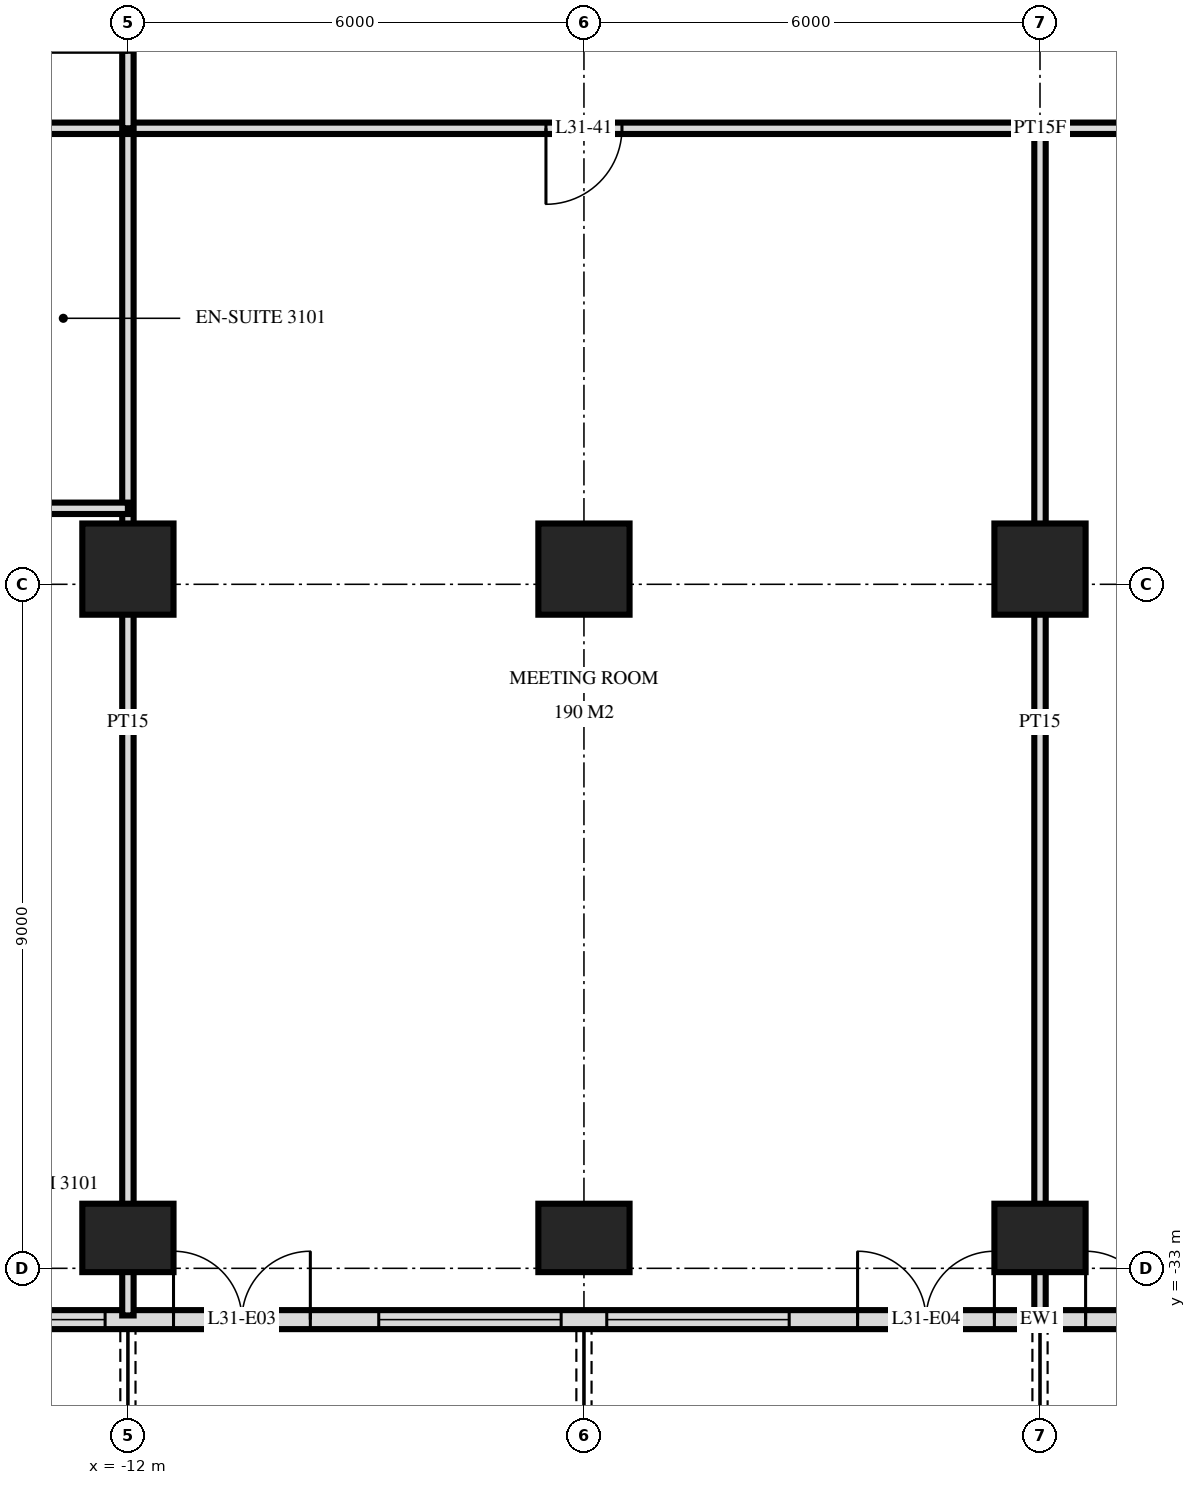
"""IFC4 building model, lengths in metres.
Left out: names, types, materials, properties, quantities, classifications, styles, units other than length and angle.
Written with IfcOpenShell. Run it as: python <this file> out.ifc"""

import sys

from ifc_helpers import new_model, si_unit, direction, frame, frame_2d, origin, origin_2d, place, context, subcontext, project, spatial, rectangle, extrude, element, fill, save


model = new_model("IFC4")
c1 = context("Model", 3, precision=1e-05, world=origin(), true_north=direction((0.0, 1.0)))
c2 = subcontext(c1, "Body", "Model", "MODEL_VIEW")
j1 = project(units=[si_unit("LENGTHUNIT", "METRE"), si_unit("PLANEANGLEUNIT", "RADIAN")], contexts=[c1])
p1 = place(None, origin())
s1 = spatial("IfcSite", under=j1, at=p1, CompositionType="ELEMENT")
p2 = place(p1, origin())
s2 = spatial("IfcBuilding", under=s1, at=p2, CompositionType="ELEMENT")
p3 = place(p2, frame((0.0, 0.0, 123.6)))
s3 = spatial("IfcBuildingStorey", under=s2, at=p3, CompositionType="ELEMENT", Elevation=123.6)
p4 = place(p3, frame((-12.0, -32.6, 0.0), z_axis=(0.0, 0.0, 1.0), x_axis=(1.0, 0.0, 0.0)))
e1 = element("IfcColumn", 1, at=p4, inside=s3, PredefinedType="COLUMN", context=c2, shape_type="SweptSolid", body=[
    extrude(rectangle(XDim=1.2, YDim=0.9, at=origin_2d()), origin(), (0.0, 0.0, 1.0), 3.6),
])
p5 = place(p3, frame((-12.0, -23.8, 0.0), z_axis=(0.0, 0.0, 1.0), x_axis=(1.0, 0.0, 0.0)))
e2 = element("IfcColumn", 2, at=p5, inside=s3, PredefinedType="COLUMN", context=c2, shape_type="SweptSolid", body=[
    extrude(rectangle(XDim=1.2, YDim=1.2, at=origin_2d()), origin(), (0.0, 0.0, 1.0), 3.6),
])
p6 = place(p3, frame((-6.0, -32.6, 0.0), z_axis=(0.0, 0.0, 1.0), x_axis=(1.0, 0.0, 0.0)))
e3 = element("IfcColumn", 3, at=p6, inside=s3, PredefinedType="COLUMN", context=c2, shape_type="SweptSolid", body=[
    extrude(rectangle(XDim=1.2, YDim=0.9, at=origin_2d()), origin(), (0.0, 0.0, 1.0), 3.6),
])
p7 = place(p3, frame((-6.0, -23.8, 0.0), z_axis=(0.0, 0.0, 1.0), x_axis=(1.0, 0.0, 0.0)))
e4 = element("IfcColumn", 4, at=p7, inside=s3, PredefinedType="COLUMN", context=c2, shape_type="SweptSolid", body=[
    extrude(rectangle(XDim=1.2, YDim=1.2, at=origin_2d()), origin(), (0.0, 0.0, 1.0), 3.6),
])
p8 = place(p3, frame((0.0, -32.6, 0.0), z_axis=(0.0, 0.0, 1.0), x_axis=(1.0, 0.0, 0.0)))
e5 = element("IfcColumn", 5, at=p8, inside=s3, PredefinedType="COLUMN", context=c2, shape_type="SweptSolid", body=[
    extrude(rectangle(XDim=1.2, YDim=0.9, at=origin_2d()), origin(), (0.0, 0.0, 1.0), 3.6),
])
p9 = place(p3, frame((0.0, -23.8, 0.0), z_axis=(0.0, 0.0, 1.0), x_axis=(1.0, 0.0, 0.0)))
e6 = element("IfcColumn", 6, at=p9, inside=s3, PredefinedType="COLUMN", context=c2, shape_type="SweptSolid", body=[
    extrude(rectangle(XDim=1.2, YDim=1.2, at=origin_2d()), origin(), (0.0, 0.0, 1.0), 3.6),
])
p10 = place(p3, frame((-23.675, -33.675, 0.0), z_axis=(0.0, 0.0, 1.0), x_axis=(1.0, 0.0, 0.0)))
e7 = element("IfcWall", 7, at=p10, inside=s3, PredefinedType="SOLIDWALL", context=c2, shape_type="SweptSolid", body=[
    extrude(rectangle(XDim=47.351, YDim=0.25, at=frame_2d((23.675, 0.0))), origin(), (0.0, 0.0, 1.0), 3.32),
])
p11 = place(p10, frame((3.425, 0.0, 0.0)))
e8 = element("IfcOpeningElement", 8, at=p11, cuts=e7, PredefinedType="OPENING", context=c2, shape_type="SweptSolid", body=[
    extrude(rectangle(XDim=1.8, YDim=2.4, at=frame_2d((0.9, 1.2))), frame((0.0, 0.135, 0.0), z_axis=(0.0, -1.0, 0.0), x_axis=(1.0, 0.0, 0.0)), (0.0, 0.0, 1.0), 0.27),
])
p12 = place(p10, frame((6.275, 0.0, 0.0)))
e9 = element("IfcOpeningElement", 9, at=p12, cuts=e7, PredefinedType="OPENING", context=c2, shape_type="SweptSolid", body=[
    extrude(rectangle(XDim=1.8, YDim=2.4, at=frame_2d((0.9, 1.2))), frame((0.0, 0.135, 0.0), z_axis=(0.0, -1.0, 0.0), x_axis=(1.0, 0.0, 0.0)), (0.0, 0.0, 1.0), 0.27),
])
p13 = place(p10, frame((8.975, 0.0, 0.3)))
e10 = element("IfcOpeningElement", 10, at=p13, cuts=e7, PredefinedType="OPENING", context=c2, shape_type="SweptSolid", body=[
    extrude(rectangle(XDim=2.4, YDim=2.1, at=frame_2d((1.2, 1.05))), frame((0.0, 0.135, 0.0), z_axis=(0.0, -1.0, 0.0), x_axis=(1.0, 0.0, 0.0)), (0.0, 0.0, 1.0), 0.27),
])
p14 = place(p10, frame((12.275, 0.0, 0.0)))
e11 = element("IfcOpeningElement", 11, at=p14, cuts=e7, PredefinedType="OPENING", context=c2, shape_type="SweptSolid", body=[
    extrude(rectangle(XDim=1.8, YDim=2.4, at=frame_2d((0.9, 1.2))), frame((0.0, 0.135, 0.0), z_axis=(0.0, -1.0, 0.0), x_axis=(1.0, 0.0, 0.0)), (0.0, 0.0, 1.0), 0.27),
])
p15 = place(p10, frame((14.975, 0.0, 0.3)))
e12 = element("IfcOpeningElement", 12, at=p15, cuts=e7, PredefinedType="OPENING", context=c2, shape_type="SweptSolid", body=[
    extrude(rectangle(XDim=2.4, YDim=2.1, at=frame_2d((1.2, 1.05))), frame((0.0, 0.135, 0.0), z_axis=(0.0, -1.0, 0.0), x_axis=(1.0, 0.0, 0.0)), (0.0, 0.0, 1.0), 0.27),
])
p16 = place(p10, frame((17.975, 0.0, 0.3)))
e13 = element("IfcOpeningElement", 13, at=p16, cuts=e7, PredefinedType="OPENING", context=c2, shape_type="SweptSolid", body=[
    extrude(rectangle(XDim=2.4, YDim=2.1, at=frame_2d((1.2, 1.05))), frame((0.0, 0.135, 0.0), z_axis=(0.0, -1.0, 0.0), x_axis=(1.0, 0.0, 0.0)), (0.0, 0.0, 1.0), 0.27),
])
p17 = place(p10, frame((21.275, 0.0, 0.0)))
e14 = element("IfcOpeningElement", 14, at=p17, cuts=e7, PredefinedType="OPENING", context=c2, shape_type="SweptSolid", body=[
    extrude(rectangle(XDim=1.8, YDim=2.4, at=frame_2d((0.9, 1.2))), frame((0.0, 0.135, 0.0), z_axis=(0.0, -1.0, 0.0), x_axis=(1.0, 0.0, 0.0)), (0.0, 0.0, 1.0), 0.27),
])
p18 = place(p10, frame((24.275, 0.0, 0.0)))
e15 = element("IfcOpeningElement", 15, at=p18, cuts=e7, PredefinedType="OPENING", context=c2, shape_type="SweptSolid", body=[
    extrude(rectangle(XDim=1.8, YDim=2.4, at=frame_2d((0.9, 1.2))), frame((0.0, 0.135, 0.0), z_axis=(0.0, -1.0, 0.0), x_axis=(1.0, 0.0, 0.0)), (0.0, 0.0, 1.0), 0.27),
])
p19 = place(p10, frame((26.975, 0.0, 0.3)))
e16 = element("IfcOpeningElement", 16, at=p19, cuts=e7, PredefinedType="OPENING", context=c2, shape_type="SweptSolid", body=[
    extrude(rectangle(XDim=2.4, YDim=2.1, at=frame_2d((1.2, 1.05))), frame((0.0, 0.135, 0.0), z_axis=(0.0, -1.0, 0.0), x_axis=(1.0, 0.0, 0.0)), (0.0, 0.0, 1.0), 0.27),
])
p20 = place(p10, frame((30.275, 0.0, 0.0)))
e17 = element("IfcOpeningElement", 17, at=p20, cuts=e7, PredefinedType="OPENING", context=c2, shape_type="SweptSolid", body=[
    extrude(rectangle(XDim=1.8, YDim=2.4, at=frame_2d((0.9, 1.2))), frame((0.0, 0.135, 0.0), z_axis=(0.0, -1.0, 0.0), x_axis=(1.0, 0.0, 0.0)), (0.0, 0.0, 1.0), 0.27),
])
p21 = place(p10, frame((32.975, 0.0, 0.3)))
e18 = element("IfcOpeningElement", 18, at=p21, cuts=e7, PredefinedType="OPENING", context=c2, shape_type="SweptSolid", body=[
    extrude(rectangle(XDim=2.4, YDim=2.1, at=frame_2d((1.2, 1.05))), frame((0.0, 0.135, 0.0), z_axis=(0.0, -1.0, 0.0), x_axis=(1.0, 0.0, 0.0)), (0.0, 0.0, 1.0), 0.27),
])
p22 = place(p10, frame((36.275, 0.0, 0.0)))
e19 = element("IfcOpeningElement", 19, at=p22, cuts=e7, PredefinedType="OPENING", context=c2, shape_type="SweptSolid", body=[
    extrude(rectangle(XDim=1.8, YDim=2.4, at=frame_2d((0.9, 1.2))), frame((0.0, 0.135, 0.0), z_axis=(0.0, -1.0, 0.0), x_axis=(1.0, 0.0, 0.0)), (0.0, 0.0, 1.0), 0.27),
])
p23 = place(p10, frame((38.975, 0.0, 0.3)))
e20 = element("IfcOpeningElement", 20, at=p23, cuts=e7, PredefinedType="OPENING", context=c2, shape_type="SweptSolid", body=[
    extrude(rectangle(XDim=2.4, YDim=2.1, at=frame_2d((1.2, 1.05))), frame((0.0, 0.135, 0.0), z_axis=(0.0, -1.0, 0.0), x_axis=(1.0, 0.0, 0.0)), (0.0, 0.0, 1.0), 0.27),
])
p24 = place(p10, frame((41.975, 0.0, 0.3)))
e21 = element("IfcOpeningElement", 21, at=p24, cuts=e7, PredefinedType="OPENING", context=c2, shape_type="SweptSolid", body=[
    extrude(rectangle(XDim=2.4, YDim=2.1, at=frame_2d((1.2, 1.05))), frame((0.0, 0.135, 0.0), z_axis=(0.0, -1.0, 0.0), x_axis=(1.0, 0.0, 0.0)), (0.0, 0.0, 1.0), 0.27),
])
p25 = place(p10, frame((45.125, 0.0, 0.0)))
e22 = element("IfcOpeningElement", 22, at=p25, cuts=e7, PredefinedType="OPENING", context=c2, shape_type="SweptSolid", body=[
    extrude(rectangle(XDim=1.8, YDim=2.4, at=frame_2d((0.9, 1.2))), frame((0.0, 0.135, 0.0), z_axis=(0.0, -1.0, 0.0), x_axis=(1.0, 0.0, 0.0)), (0.0, 0.0, 1.0), 0.27),
])
p26 = place(p3, frame((0.0, -33.62, 0.0), z_axis=(0.0, 0.0, 1.0), x_axis=(0.0, 1.0, 0.0)))
e23 = element("IfcWall", 23, at=p26, inside=s3, PredefinedType="PARTITIONING", context=c2, shape_type="SweptSolid", body=[
    extrude(rectangle(XDim=15.62, YDim=0.15, at=frame_2d((7.81, 0.0))), origin(), (0.0, 0.0, 1.0), 3.32),
])
p27 = place(p3, frame((-12.0, -18.0, 0.0), z_axis=(0.0, 0.0, 1.0), x_axis=(0.0, 1.0, 0.0)))
e24 = element("IfcWall", 24, at=p27, inside=s3, PredefinedType="PARTITIONING", context=c2, shape_type="SweptSolid", body=[
    extrude(rectangle(XDim=2.95, YDim=0.15, at=frame_2d((1.475, 0.0))), origin(), (0.0, 0.0, 1.0), 3.32),
])
p28 = place(p27, frame((1.0, 0.0, 0.0)))
e25 = element("IfcOpeningElement", 25, at=p28, cuts=e24, PredefinedType="OPENING", context=c2, shape_type="SweptSolid", body=[
    extrude(rectangle(XDim=1.0, YDim=2.1, at=frame_2d((0.5, 1.05))), frame((0.0, 0.085, 0.0), z_axis=(0.0, -1.0, 0.0), x_axis=(1.0, 0.0, 0.0)), (0.0, 0.0, 1.0), 0.17),
])
p29 = place(p3, frame((-12.0, -33.62, 0.0), z_axis=(0.0, 0.0, 1.0), x_axis=(0.0, 1.0, 0.0)))
e26 = element("IfcWall", 26, at=p29, inside=s3, PredefinedType="PARTITIONING", context=c2, shape_type="SweptSolid", body=[
    extrude(rectangle(XDim=15.62, YDim=0.15, at=frame_2d((7.81, 0.0))), origin(), (0.0, 0.0, 1.0), 3.32),
])
p30 = place(p3, frame((-13.7, -23.0, 0.0), z_axis=(0.0, 0.0, 1.0), x_axis=(1.0, 0.0, 0.0)))
e27 = element("IfcWall", 27, at=p30, inside=s3, PredefinedType="PARTITIONING", context=c2, shape_type="SweptSolid", body=[
    extrude(rectangle(XDim=1.7, YDim=0.15, at=frame_2d((0.85, 0.0))), origin(), (0.0, 0.0, 1.0), 3.32),
])
p31 = place(p3, frame((-28.02, -18.0, 0.0), z_axis=(0.0, 0.0, 1.0), x_axis=(1.0, 0.0, 0.0)))
e28 = element("IfcWall", 28, at=p31, inside=s3, PredefinedType="PARTITIONING", context=c2, shape_type="SweptSolid", body=[
    extrude(rectangle(XDim=56.04, YDim=0.15, at=frame_2d((28.02, 0.0))), origin(), (0.0, 0.0, 1.0), 3.32),
])
p32 = place(p31, frame((13.17, 0.0, 0.0)))
e29 = element("IfcOpeningElement", 29, at=p32, cuts=e28, PredefinedType="OPENING", context=c2, shape_type="SweptSolid", body=[
    extrude(rectangle(XDim=1.0, YDim=2.1, at=frame_2d((0.5, 1.05))), frame((0.0, 0.085, 0.0), z_axis=(0.0, -1.0, 0.0), x_axis=(1.0, 0.0, 0.0)), (0.0, 0.0, 1.0), 0.17),
])
p33 = place(p31, frame((11.32, 0.0, 0.0)))
e30 = element("IfcOpeningElement", 30, at=p33, cuts=e28, PredefinedType="OPENING", context=c2, shape_type="SweptSolid", body=[
    extrude(rectangle(XDim=1.0, YDim=2.1, at=frame_2d((0.5, 1.05))), frame((0.0, 0.085, 0.0), z_axis=(0.0, -1.0, 0.0), x_axis=(1.0, 0.0, 0.0)), (0.0, 0.0, 1.0), 0.17),
])
p34 = place(p31, frame((41.87, 0.0, 0.0)))
e31 = element("IfcOpeningElement", 31, at=p34, cuts=e28, PredefinedType="OPENING", context=c2, shape_type="SweptSolid", body=[
    extrude(rectangle(XDim=1.0, YDim=2.1, at=frame_2d((0.5, 1.05))), frame((0.0, 0.085, 0.0), z_axis=(0.0, -1.0, 0.0), x_axis=(1.0, 0.0, 0.0)), (0.0, 0.0, 1.0), 0.17),
])
p35 = place(p31, frame((43.17, 0.0, 0.0)))
e32 = element("IfcOpeningElement", 32, at=p35, cuts=e28, PredefinedType="OPENING", context=c2, shape_type="SweptSolid", body=[
    extrude(rectangle(XDim=1.0, YDim=2.1, at=frame_2d((0.5, 1.05))), frame((0.0, 0.085, 0.0), z_axis=(0.0, -1.0, 0.0), x_axis=(1.0, 0.0, 0.0)), (0.0, 0.0, 1.0), 0.17),
])
p36 = place(p31, frame((46.72, 0.0, 0.0)))
e33 = element("IfcOpeningElement", 33, at=p36, cuts=e28, PredefinedType="OPENING", context=c2, shape_type="SweptSolid", body=[
    extrude(rectangle(XDim=1.0, YDim=2.1, at=frame_2d((0.5, 1.05))), frame((0.0, 0.085, 0.0), z_axis=(0.0, -1.0, 0.0), x_axis=(1.0, 0.0, 0.0)), (0.0, 0.0, 1.0), 0.17),
])
p37 = place(p31, frame((21.52, 0.0, 0.0)))
e34 = element("IfcOpeningElement", 34, at=p37, cuts=e28, PredefinedType="OPENING", context=c2, shape_type="SweptSolid", body=[
    extrude(rectangle(XDim=1.0, YDim=2.1, at=frame_2d((0.5, 1.05))), frame((0.0, 0.085, 0.0), z_axis=(0.0, -1.0, 0.0), x_axis=(1.0, 0.0, 0.0)), (0.0, 0.0, 1.0), 0.17),
])
p38 = place(p31, frame((33.52, 0.0, 0.0)))
e35 = element("IfcOpeningElement", 35, at=p38, cuts=e28, PredefinedType="OPENING", context=c2, shape_type="SweptSolid", body=[
    extrude(rectangle(XDim=1.0, YDim=2.1, at=frame_2d((0.5, 1.05))), frame((0.0, 0.085, 0.0), z_axis=(0.0, -1.0, 0.0), x_axis=(1.0, 0.0, 0.0)), (0.0, 0.0, 1.0), 0.17),
])
p39 = place(p13, origin())
e36 = element("IfcWindow", 36, at=p39, inside=s3, PartitioningType="SINGLE_PANEL", PredefinedType="WINDOW", context=c2, shape_type="SweptSolid", body=[
    extrude(rectangle(XDim=2.4, YDim=2.1, at=frame_2d((1.2, 1.05))), frame((0.0, 0.03, 0.0), z_axis=(0.0, -1.0, 0.0), x_axis=(1.0, 0.0, 0.0)), (0.0, 0.0, 1.0), 0.06),
])
fill(e10, e36)
p40 = place(p14, origin())
e37 = element("IfcDoor", 37, at=p40, inside=s3, OperationType="DOUBLE_DOOR_SINGLE_SWING", PredefinedType="DOOR", context=c2, shape_type="SweptSolid", body=[
    extrude(rectangle(XDim=1.8, YDim=2.4, at=frame_2d((0.9, 1.2))), frame((0.0, 0.025, 0.0), z_axis=(0.0, -1.0, 0.0), x_axis=(1.0, 0.0, 0.0)), (0.0, 0.0, 1.0), 0.05),
])
fill(e11, e37)
p41 = place(p15, origin())
e38 = element("IfcWindow", 38, at=p41, inside=s3, PartitioningType="SINGLE_PANEL", PredefinedType="WINDOW", context=c2, shape_type="SweptSolid", body=[
    extrude(rectangle(XDim=2.4, YDim=2.1, at=frame_2d((1.2, 1.05))), frame((0.0, 0.03, 0.0), z_axis=(0.0, -1.0, 0.0), x_axis=(1.0, 0.0, 0.0)), (0.0, 0.0, 1.0), 0.06),
])
fill(e12, e38)
p42 = place(p16, origin())
e39 = element("IfcWindow", 39, at=p42, inside=s3, PartitioningType="SINGLE_PANEL", PredefinedType="WINDOW", context=c2, shape_type="SweptSolid", body=[
    extrude(rectangle(XDim=2.4, YDim=2.1, at=frame_2d((1.2, 1.05))), frame((0.0, 0.03, 0.0), z_axis=(0.0, -1.0, 0.0), x_axis=(1.0, 0.0, 0.0)), (0.0, 0.0, 1.0), 0.06),
])
fill(e13, e39)
p43 = place(p17, origin())
e40 = element("IfcDoor", 40, at=p43, inside=s3, OperationType="DOUBLE_DOOR_SINGLE_SWING", PredefinedType="DOOR", context=c2, shape_type="SweptSolid", body=[
    extrude(rectangle(XDim=1.8, YDim=2.4, at=frame_2d((0.9, 1.2))), frame((0.0, 0.025, 0.0), z_axis=(0.0, -1.0, 0.0), x_axis=(1.0, 0.0, 0.0)), (0.0, 0.0, 1.0), 0.05),
])
fill(e14, e40)
p44 = place(p18, origin())
e41 = element("IfcDoor", 41, at=p44, inside=s3, OperationType="DOUBLE_DOOR_SINGLE_SWING", PredefinedType="DOOR", context=c2, shape_type="SweptSolid", body=[
    extrude(rectangle(XDim=1.8, YDim=2.4, at=frame_2d((0.9, 1.2))), frame((0.0, 0.025, 0.0), z_axis=(0.0, -1.0, 0.0), x_axis=(1.0, 0.0, 0.0)), (0.0, 0.0, 1.0), 0.05),
])
fill(e15, e41)
p45 = place(p37, frame((0.5, 0.0, 0.0), z_axis=(0.0, 0.0, 1.0), x_axis=(-1.0, 0.0, 0.0)))
e42 = element("IfcDoor", 42, at=p45, inside=s3, OperationType="SINGLE_SWING_LEFT", PredefinedType="DOOR", context=c2, shape_type="SweptSolid", body=[
    extrude(rectangle(XDim=1.0, YDim=2.1, at=frame_2d((0.0, 1.05))), frame((0.0, -0.025, 0.0), z_axis=(0.0, 1.0, 0.0), x_axis=(-1.0, 0.0, 0.0)), (0.0, 0.0, 1.0), 0.05),
])
fill(e34, e42)
save(model, sys.argv[1])
